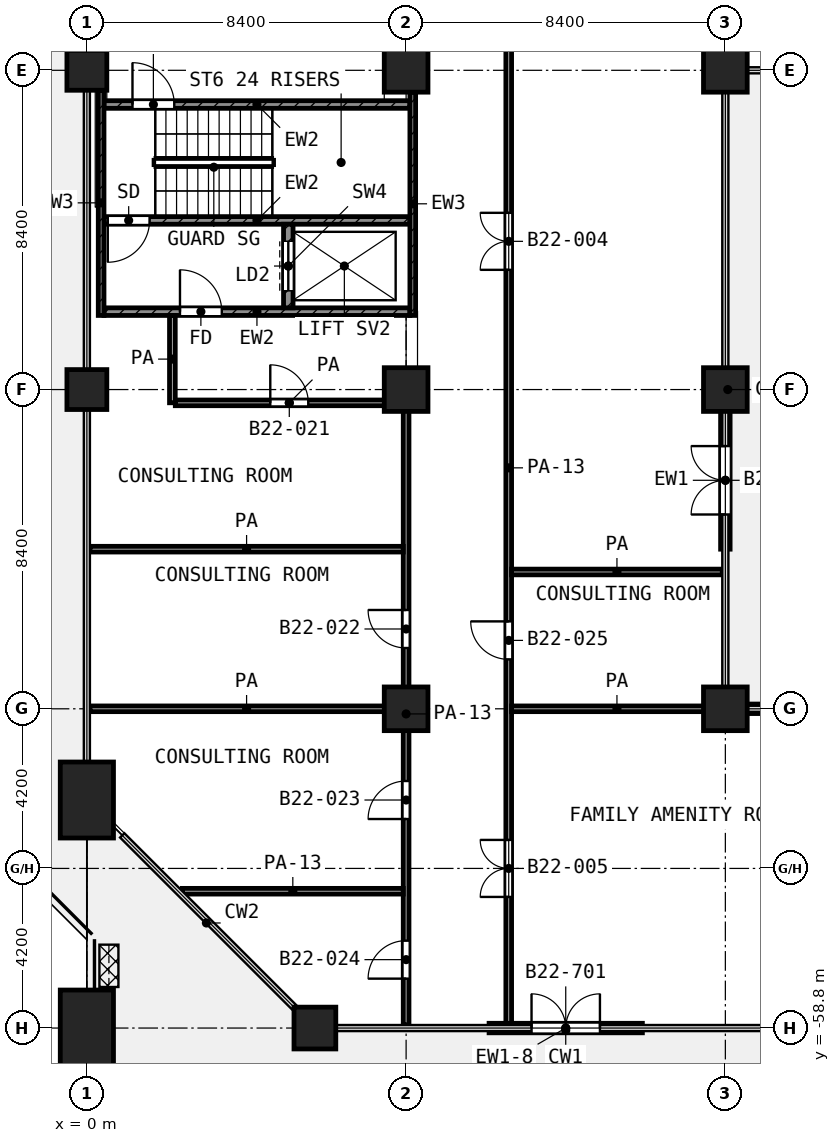
"""IFC4 building model, lengths in metres.
Left out: names, types, materials, properties, quantities, classifications, styles, units other than length and angle.
Written with IfcOpenShell. Run it as: python <this file> out.ifc"""

import sys

from ifc_helpers import new_model, si_unit, direction, frame, frame_2d, origin, origin_2d, place, context, subcontext, project, spatial, rectangle, extrude, element, fill, save


model = new_model("IFC4")
c1 = context("Model", 3, precision=1e-05, world=origin(), true_north=direction((0.0, 1.0)))
c2 = subcontext(c1, "Body", "Model", "MODEL_VIEW")
j1 = project(units=[si_unit("LENGTHUNIT", "METRE"), si_unit("PLANEANGLEUNIT", "RADIAN")], contexts=[c1])
p1 = place(None, origin())
s1 = spatial("IfcSite", under=j1, at=p1, CompositionType="ELEMENT")
p2 = place(p1, origin())
s2 = spatial("IfcBuilding", under=s1, at=p2, CompositionType="ELEMENT")
p3 = place(p2, frame((0.0, 0.0, 98.8)))
s3 = spatial("IfcBuildingStorey", under=s2, at=p3, CompositionType="ELEMENT", Elevation=98.8)
p4 = place(p3, frame((0.0, -33.6, 0.0), z_axis=(0.0, 0.0, 1.0), x_axis=(1.0, 0.0, 0.0)))
e1 = element("IfcColumn", 1, at=p4, inside=s3, PredefinedType="COLUMN", context=c2, shape_type="SweptSolid", body=[
    extrude(rectangle(XDim=1.05, YDim=1.05, at=origin_2d()), origin(), (0.0, 0.0, 1.0), 4.2),
])
for number, where, z_axis, x_axis in (
    (2, (8.4, -33.6, 0.0), (0.0, 0.0, 1.0), (1.0, 0.0, 0.0)),
    (3, (16.8, -33.6, 0.0), (0.0, 0.0, 1.0), (1.0, 0.0, 0.0)),
):
    element("IfcColumn", number, at=place(p3, frame(where, z_axis=z_axis, x_axis=x_axis)), inside=s3, PredefinedType="COLUMN", context=c2, shape_type="SweptSolid", body=[
        extrude(rectangle(XDim=1.15, YDim=1.15, at=origin_2d()), origin(), (0.0, 0.0, 1.0), 4.2),
    ])
p5 = place(p3, frame((0.0, -42.0, 0.0), z_axis=(0.0, 0.0, 1.0), x_axis=(1.0, 0.0, 0.0)))
e4 = element("IfcColumn", 4, at=p5, inside=s3, PredefinedType="COLUMN", context=c2, shape_type="SweptSolid", body=[
    extrude(rectangle(XDim=1.05, YDim=1.05, at=origin_2d()), origin(), (0.0, 0.0, 1.0), 4.2),
])
for number, where, z_axis, x_axis in (
    (5, (8.4, -42.0, 0.0), (0.0, 0.0, 1.0), (1.0, 0.0, 0.0)),
    (6, (16.8, -42.0, 0.0), (0.0, 0.0, 1.0), (1.0, 0.0, 0.0)),
    (7, (8.4, -50.4, 0.0), (0.0, 0.0, 1.0), (1.0, 0.0, 0.0)),
    (8, (16.8, -50.4, 0.0), (0.0, 0.0, 1.0), (1.0, 0.0, 0.0)),
):
    element("IfcColumn", number, at=place(p3, frame(where, z_axis=z_axis, x_axis=x_axis)), inside=s3, PredefinedType="COLUMN", context=c2, shape_type="SweptSolid", body=[
        extrude(rectangle(XDim=1.15, YDim=1.15, at=origin_2d()), origin(), (0.0, 0.0, 1.0), 4.2),
    ])
p6 = place(p3, frame((0.0, -52.8, 0.0), z_axis=(0.0, 0.0, 1.0), x_axis=(0.0, 1.0, 0.0)))
e9 = element("IfcColumn", 9, at=p6, inside=s3, PredefinedType="COLUMN", context=c2, shape_type="SweptSolid", body=[
    extrude(rectangle(XDim=2.0, YDim=1.4, at=origin_2d()), origin(), (0.0, 0.0, 1.0), 4.2),
])
p7 = place(p3, frame((6.0, -58.8, 0.0), z_axis=(0.0, 0.0, 1.0), x_axis=(1.0, 0.0, 0.0)))
e10 = element("IfcColumn", 10, at=p7, inside=s3, PredefinedType="COLUMN", context=c2, shape_type="SweptSolid", body=[
    extrude(rectangle(XDim=1.1, YDim=1.1, at=origin_2d()), origin(), (0.0, 0.0, 1.0), 4.2),
])
p8 = place(p3, frame((0.0, -58.8, 0.0), z_axis=(0.0, 0.0, 1.0), x_axis=(0.0, 1.0, 0.0)))
e11 = element("IfcColumn", 11, at=p8, inside=s3, PredefinedType="COLUMN", context=c2, shape_type="SweptSolid", body=[
    extrude(rectangle(XDim=2.0, YDim=1.4, at=origin_2d()), origin(), (0.0, 0.0, 1.0), 4.2),
])
p9 = place(p3, frame((20.938, -50.4, 0.0), z_axis=(0.0, 0.0, 1.0), x_axis=(-1.0, 0.0, 0.0)))
e12 = element("IfcWall", 12, at=p9, inside=s3, PredefinedType="SOLIDWALL", context=c2, shape_type="SweptSolid", body=[
    extrude(rectangle(XDim=3.562, YDim=0.25, at=frame_2d((1.781, 0.0))), origin(), (0.0, 0.0, 1.0), 3.46),
])
p10 = place(p9, frame((0.881, 0.0, 0.0)))
e13 = element("IfcOpeningElement", 13, at=p10, cuts=e12, PredefinedType="OPENING", context=c2, shape_type="SweptSolid", body=[
    extrude(rectangle(XDim=1.8, YDim=2.1, at=frame_2d((0.9, 1.05))), frame((0.0, 0.135, 0.0), z_axis=(0.0, -1.0, 0.0), x_axis=(1.0, 0.0, 0.0)), (0.0, 0.0, 1.0), 0.27),
])
p11 = place(p3, frame((16.8, -46.2, 0.0), z_axis=(0.0, 0.0, 1.0), x_axis=(0.0, 1.0, 0.0)))
e14 = element("IfcWall", 14, at=p11, inside=s3, PredefinedType="SOLIDWALL", context=c2, shape_type="SweptSolid", body=[
    extrude(rectangle(XDim=3.625, YDim=0.25, at=frame_2d((1.812, 0.0))), origin(), (0.0, 0.0, 1.0), 3.46),
])
p12 = place(p11, frame((0.913, 0.0, 0.0)))
e15 = element("IfcOpeningElement", 15, at=p12, cuts=e14, PredefinedType="OPENING", context=c2, shape_type="SweptSolid", body=[
    extrude(rectangle(XDim=1.8, YDim=2.1, at=frame_2d((0.9, 1.05))), frame((0.0, 0.135, 0.0), z_axis=(0.0, -1.0, 0.0), x_axis=(1.0, 0.0, 0.0)), (0.0, 0.0, 1.0), 0.27),
])
p13 = place(p3, frame((10.583, -58.8, 0.0), z_axis=(0.0, 0.0, 1.0), x_axis=(1.0, 0.0, 0.0)))
e16 = element("IfcWall", 16, at=p13, inside=s3, PredefinedType="SOLIDWALL", context=c2, shape_type="SweptSolid", body=[
    extrude(rectangle(XDim=4.033, YDim=0.25, at=frame_2d((2.017, 0.0))), origin(), (0.0, 0.0, 1.0), 2.58),
])
p14 = place(p13, frame((1.117, 0.0, 0.0)))
e17 = element("IfcOpeningElement", 17, at=p14, cuts=e16, PredefinedType="OPENING", context=c2, shape_type="SweptSolid", body=[
    extrude(rectangle(XDim=1.8, YDim=2.1, at=frame_2d((0.9, 1.05))), frame((0.0, 0.135, 0.0), z_axis=(0.0, -1.0, 0.0), x_axis=(1.0, 0.0, 0.0)), (0.0, 0.0, 1.0), 0.27),
])
p15 = place(p3, frame((0.375, -40.05, 0.0), z_axis=(0.0, 0.0, 1.0), x_axis=(0.0, 1.0, 0.0)))
e18 = element("IfcWall", 18, at=p15, inside=s3, PredefinedType="SHEAR", context=c2, shape_type="SweptSolid", body=[
    extrude(rectangle(XDim=5.925, YDim=0.15, at=frame_2d((2.962, 0.0))), origin(), (0.0, 0.0, 1.0), 3.6),
])
p16 = place(p3, frame((8.575, -40.05, 0.0), z_axis=(0.0, 0.0, 1.0), x_axis=(0.0, 1.0, 0.0)))
e19 = element("IfcWall", 19, at=p16, inside=s3, PredefinedType="SHEAR", context=c2, shape_type="SweptSolid", body=[
    extrude(rectangle(XDim=5.875, YDim=0.15, at=frame_2d((2.938, 0.0))), origin(), (0.0, 0.0, 1.0), 3.6),
])
p17 = place(p3, frame((0.45, -34.5, 0.0), z_axis=(0.0, 0.0, 1.0), x_axis=(1.0, 0.0, 0.0)))
e20 = element("IfcWall", 20, at=p17, inside=s3, PredefinedType="SHEAR", context=c2, shape_type="SweptSolid", body=[
    extrude(rectangle(XDim=8.05, YDim=0.2, at=frame_2d((4.025, 0.0))), origin(), (0.0, 0.0, 1.0), 3.6),
])
p18 = place(p17, frame((0.75, 0.0, 0.0)))
e21 = element("IfcOpeningElement", 21, at=p18, cuts=e20, PredefinedType="OPENING", context=c2, shape_type="SweptSolid", body=[
    extrude(rectangle(XDim=1.1, YDim=2.1, at=frame_2d((0.55, 1.05))), frame((0.0, 0.11, 0.0), z_axis=(0.0, -1.0, 0.0), x_axis=(1.0, 0.0, 0.0)), (0.0, 0.0, 1.0), 0.22),
])
p19 = place(p3, frame((0.45, -37.55, 0.0), z_axis=(0.0, 0.0, 1.0), x_axis=(1.0, 0.0, 0.0)))
e22 = element("IfcWall", 22, at=p19, inside=s3, PredefinedType="SHEAR", context=c2, shape_type="SweptSolid", body=[
    extrude(rectangle(XDim=8.05, YDim=0.2, at=frame_2d((4.025, 0.0))), origin(), (0.0, 0.0, 1.0), 3.6),
])
p20 = place(p19, frame((0.1, 0.0, 0.0)))
e23 = element("IfcOpeningElement", 23, at=p20, cuts=e22, PredefinedType="OPENING", context=c2, shape_type="SweptSolid", body=[
    extrude(rectangle(XDim=1.1, YDim=2.1, at=frame_2d((0.55, 1.05))), frame((0.0, 0.11, 0.0), z_axis=(0.0, -1.0, 0.0), x_axis=(1.0, 0.0, 0.0)), (0.0, 0.0, 1.0), 0.22),
])
p21 = place(p3, frame((0.45, -39.95, 0.0), z_axis=(0.0, 0.0, 1.0), x_axis=(1.0, 0.0, 0.0)))
e24 = element("IfcWall", 24, at=p21, inside=s3, PredefinedType="SHEAR", context=c2, shape_type="SweptSolid", body=[
    extrude(rectangle(XDim=8.05, YDim=0.2, at=frame_2d((4.025, 0.0))), origin(), (0.0, 0.0, 1.0), 3.6),
])
p22 = place(p21, frame((2.0, 0.0, 0.0)))
e25 = element("IfcOpeningElement", 25, at=p22, cuts=e24, PredefinedType="OPENING", context=c2, shape_type="SweptSolid", body=[
    extrude(rectangle(XDim=1.1, YDim=2.1, at=frame_2d((0.55, 1.05))), frame((0.0, 0.11, 0.0), z_axis=(0.0, -1.0, 0.0), x_axis=(1.0, 0.0, 0.0)), (0.0, 0.0, 1.0), 0.22),
])
p23 = place(p3, frame((5.3, -39.85, 0.0), z_axis=(0.0, 0.0, 1.0), x_axis=(0.0, 1.0, 0.0)))
e26 = element("IfcWall", 26, at=p23, inside=s3, PredefinedType="SHEAR", context=c2, shape_type="SweptSolid", body=[
    extrude(rectangle(XDim=2.2, YDim=0.25, at=frame_2d((1.1, 0.0))), origin(), (0.0, 0.0, 1.0), 3.6),
])
p24 = place(p23, frame((0.45, 0.0, 0.0)))
e27 = element("IfcOpeningElement", 27, at=p24, cuts=e26, PredefinedType="OPENING", context=c2, shape_type="SweptSolid", body=[
    extrude(rectangle(XDim=1.3, YDim=2.1, at=frame_2d((0.65, 1.05))), frame((0.0, 0.135, 0.0), z_axis=(0.0, -1.0, 0.0), x_axis=(1.0, 0.0, 0.0)), (0.0, 0.0, 1.0), 0.27),
])
p25 = place(p3, frame((2.513, -55.2, 0.0), z_axis=(0.0, 0.0, 1.0), x_axis=(1.0, 0.0, 0.0)))
e28 = element("IfcWall", 28, at=p25, inside=s3, PredefinedType="PARTITIONING", context=c2, shape_type="SweptSolid", body=[
    extrude(rectangle(XDim=5.812, YDim=0.15, at=frame_2d((2.906, 0.0))), origin(), (0.0, 0.0, 1.0), 2.7),
])
p26 = place(p3, frame((0.08, -50.4, 0.0), z_axis=(0.0, 0.0, 1.0), x_axis=(1.0, 0.0, 0.0)))
e29 = element("IfcWall", 29, at=p26, inside=s3, PredefinedType="PARTITIONING", context=c2, shape_type="SweptSolid", body=[
    extrude(rectangle(XDim=8.245, YDim=0.15, at=frame_2d((4.123, 0.0))), origin(), (0.0, 0.0, 1.0), 3.6),
])
for number, where, z_axis, x_axis in (
    (30, (11.175, -50.4, 0.0), (0.0, 0.0, 1.0), (1.0, 0.0, 0.0)),
    (31, (11.175, -46.8, 0.0), (0.0, 0.0, 1.0), (1.0, 0.0, 0.0)),
):
    element("IfcWall", number, at=place(p3, frame(where, z_axis=z_axis, x_axis=x_axis)), inside=s3, PredefinedType="PARTITIONING", context=c2, shape_type="SweptSolid", body=[
        extrude(rectangle(XDim=5.545, YDim=0.15, at=frame_2d((2.772, 0.0))), origin(), (0.0, 0.0, 1.0), 3.6),
    ])
p27 = place(p3, frame((0.08, -46.2, 0.0), z_axis=(0.0, 0.0, 1.0), x_axis=(1.0, 0.0, 0.0)))
e32 = element("IfcWall", 32, at=p27, inside=s3, PredefinedType="PARTITIONING", context=c2, shape_type="SweptSolid", body=[
    extrude(rectangle(XDim=8.245, YDim=0.15, at=frame_2d((4.123, 0.0))), origin(), (0.0, 0.0, 1.0), 3.6),
])
p28 = place(p3, frame((2.327, -42.35, 0.0), z_axis=(0.0, 0.0, 1.0), x_axis=(1.0, 0.0, 0.0)))
e33 = element("IfcWall", 33, at=p28, inside=s3, PredefinedType="PARTITIONING", context=c2, shape_type="SweptSolid", body=[
    extrude(rectangle(XDim=5.998, YDim=0.15, at=frame_2d((2.999, 0.0))), origin(), (0.0, 0.0, 1.0), 3.6),
])
p29 = place(p28, frame((2.499, 0.0, 0.0)))
e34 = element("IfcOpeningElement", 34, at=p29, cuts=e33, PredefinedType="OPENING", context=c2, shape_type="SweptSolid", body=[
    extrude(rectangle(XDim=1.0, YDim=2.1, at=frame_2d((0.5, 1.05))), frame((0.0, 0.085, 0.0), z_axis=(0.0, -1.0, 0.0), x_axis=(1.0, 0.0, 0.0)), (0.0, 0.0, 1.0), 0.17),
])
p30 = place(p3, frame((2.25, -42.348, 0.0), z_axis=(0.0, 0.0, 1.0), x_axis=(0.0, 1.0, 0.0)))
e35 = element("IfcWall", 35, at=p30, inside=s3, PredefinedType="PARTITIONING", context=c2, shape_type="SweptSolid", body=[
    extrude(rectangle(XDim=2.298, YDim=0.15, at=frame_2d((1.149, 0.0))), origin(), (0.0, 0.0, 1.0), 3.6),
])
p31 = place(p3, frame((8.4, -58.72, 0.0), z_axis=(0.0, 0.0, 1.0), x_axis=(0.0, 1.0, 0.0)))
e36 = element("IfcWall", 36, at=p31, inside=s3, PredefinedType="PARTITIONING", context=c2, shape_type="SweptSolid", body=[
    extrude(rectangle(XDim=16.37, YDim=0.15, at=frame_2d((8.185, 0.0))), origin(), (0.0, 0.0, 1.0), 2.7),
])
p32 = place(p31, frame((9.92, 0.0, 0.0)))
e37 = element("IfcOpeningElement", 37, at=p32, cuts=e36, PredefinedType="OPENING", context=c2, shape_type="SweptSolid", body=[
    extrude(rectangle(XDim=1.0, YDim=2.1, at=frame_2d((0.5, 1.05))), frame((0.0, 0.085, 0.0), z_axis=(0.0, -1.0, 0.0), x_axis=(1.0, 0.0, 0.0)), (0.0, 0.0, 1.0), 0.17),
])
p33 = place(p31, frame((5.42, 0.0, 0.0)))
e38 = element("IfcOpeningElement", 38, at=p33, cuts=e36, PredefinedType="OPENING", context=c2, shape_type="SweptSolid", body=[
    extrude(rectangle(XDim=1.0, YDim=2.1, at=frame_2d((0.5, 1.05))), frame((0.0, 0.085, 0.0), z_axis=(0.0, -1.0, 0.0), x_axis=(1.0, 0.0, 0.0)), (0.0, 0.0, 1.0), 0.17),
])
p34 = place(p31, frame((1.22, 0.0, 0.0)))
e39 = element("IfcOpeningElement", 39, at=p34, cuts=e36, PredefinedType="OPENING", context=c2, shape_type="SweptSolid", body=[
    extrude(rectangle(XDim=1.0, YDim=2.1, at=frame_2d((0.5, 1.05))), frame((0.0, 0.085, 0.0), z_axis=(0.0, -1.0, 0.0), x_axis=(1.0, 0.0, 0.0)), (0.0, 0.0, 1.0), 0.17),
])
p35 = place(p3, frame((11.1, -58.72, 0.0), z_axis=(0.0, 0.0, 1.0), x_axis=(0.0, 1.0, 0.0)))
e40 = element("IfcWall", 40, at=p35, inside=s3, PredefinedType="PARTITIONING", context=c2, shape_type="SweptSolid", body=[
    extrude(rectangle(XDim=29.32, YDim=0.15, at=frame_2d((14.66, 0.0))), origin(), (0.0, 0.0, 1.0), 2.7),
])
p36 = place(p35, frame((19.87, 0.0, 0.0)))
e41 = element("IfcOpeningElement", 41, at=p36, cuts=e40, PredefinedType="OPENING", context=c2, shape_type="SweptSolid", body=[
    extrude(rectangle(XDim=1.5, YDim=2.1, at=frame_2d((0.75, 1.05))), frame((0.0, 0.085, 0.0), z_axis=(0.0, -1.0, 0.0), x_axis=(1.0, 0.0, 0.0)), (0.0, 0.0, 1.0), 0.17),
])
p37 = place(p35, frame((9.62, 0.0, 0.0)))
e42 = element("IfcOpeningElement", 42, at=p37, cuts=e40, PredefinedType="OPENING", context=c2, shape_type="SweptSolid", body=[
    extrude(rectangle(XDim=1.0, YDim=2.1, at=frame_2d((0.5, 1.05))), frame((0.0, 0.085, 0.0), z_axis=(0.0, -1.0, 0.0), x_axis=(1.0, 0.0, 0.0)), (0.0, 0.0, 1.0), 0.17),
])
p38 = place(p35, frame((3.37, 0.0, 0.0)))
e43 = element("IfcOpeningElement", 43, at=p38, cuts=e40, PredefinedType="OPENING", context=c2, shape_type="SweptSolid", body=[
    extrude(rectangle(XDim=1.5, YDim=2.1, at=frame_2d((0.75, 1.05))), frame((0.0, 0.085, 0.0), z_axis=(0.0, -1.0, 0.0), x_axis=(1.0, 0.0, 0.0)), (0.0, 0.0, 1.0), 0.17),
])
p39 = place(p12, origin())
e44 = element("IfcDoor", 44, at=p39, inside=s3, OperationType="DOUBLE_DOOR_SINGLE_SWING", PredefinedType="DOOR", context=c2, shape_type="SweptSolid", body=[
    extrude(rectangle(XDim=1.8, YDim=2.1, at=frame_2d((0.9, 1.05))), frame((0.0, 0.025, 0.0), z_axis=(0.0, -1.0, 0.0), x_axis=(1.0, 0.0, 0.0)), (0.0, 0.0, 1.0), 0.05),
])
fill(e15, e44)
p40 = place(p14, origin())
e45 = element("IfcDoor", 45, at=p40, inside=s3, OperationType="DOUBLE_DOOR_SINGLE_SWING", PredefinedType="DOOR", context=c2, shape_type="SweptSolid", body=[
    extrude(rectangle(XDim=1.8, YDim=2.1, at=frame_2d((0.9, 1.05))), frame((0.0, 0.025, 0.0), z_axis=(0.0, -1.0, 0.0), x_axis=(1.0, 0.0, 0.0)), (0.0, 0.0, 1.0), 0.05),
])
fill(e17, e45)
p41 = place(p18, origin())
e46 = element("IfcDoor", 46, at=p41, inside=s3, OperationType="SINGLE_SWING_LEFT", PredefinedType="DOOR", context=c2, shape_type="SweptSolid", body=[
    extrude(rectangle(XDim=1.1, YDim=2.1, at=frame_2d((0.55, 1.05))), frame((0.0, 0.025, 0.0), z_axis=(0.0, -1.0, 0.0), x_axis=(1.0, 0.0, 0.0)), (0.0, 0.0, 1.0), 0.05),
])
fill(e21, e46)
p42 = place(p20, frame((1.1, 0.0, 0.0), z_axis=(0.0, 0.0, 1.0), x_axis=(-1.0, 0.0, 0.0)))
e47 = element("IfcDoor", 47, at=p42, inside=s3, OperationType="SINGLE_SWING_LEFT", PredefinedType="DOOR", context=c2, shape_type="SweptSolid", body=[
    extrude(rectangle(XDim=1.1, YDim=2.1, at=frame_2d((0.55, 1.05))), frame((0.0, 0.025, 0.0), z_axis=(0.0, -1.0, 0.0), x_axis=(1.0, 0.0, 0.0)), (0.0, 0.0, 1.0), 0.05),
])
fill(e23, e47)
p43 = place(p24, origin())
e48 = element("IfcDoor", 48, at=p43, inside=s3, OperationType="DOUBLE_DOOR_SLIDING", PredefinedType="DOOR", context=c2, shape_type="SweptSolid", body=[
    extrude(rectangle(XDim=1.3, YDim=2.1, at=frame_2d((0.65, 1.05))), frame((0.0, 0.025, 0.0), z_axis=(0.0, -1.0, 0.0), x_axis=(1.0, 0.0, 0.0)), (0.0, 0.0, 1.0), 0.05),
])
fill(e27, e48)
p44 = place(p22, origin())
e49 = element("IfcDoor", 49, at=p44, inside=s3, OperationType="SINGLE_SWING_LEFT", PredefinedType="DOOR", context=c2, shape_type="SweptSolid", body=[
    extrude(rectangle(XDim=1.1, YDim=2.1, at=frame_2d((0.55, 1.05))), frame((0.0, 0.025, 0.0), z_axis=(0.0, -1.0, 0.0), x_axis=(1.0, 0.0, 0.0)), (0.0, 0.0, 1.0), 0.05),
])
fill(e25, e49)
p45 = place(p29, origin())
e50 = element("IfcDoor", 50, at=p45, inside=s3, OperationType="SINGLE_SWING_LEFT", PredefinedType="DOOR", context=c2, shape_type="SweptSolid", body=[
    extrude(rectangle(XDim=1.0, YDim=2.1, at=frame_2d((0.5, 1.05))), frame((0.0, 0.025, 0.0), z_axis=(0.0, -1.0, 0.0), x_axis=(1.0, 0.0, 0.0)), (0.0, 0.0, 1.0), 0.05),
])
fill(e34, e50)
p46 = place(p32, origin())
e51 = element("IfcDoor", 51, at=p46, inside=s3, OperationType="SINGLE_SWING_RIGHT", PredefinedType="DOOR", context=c2, shape_type="SweptSolid", body=[
    extrude(rectangle(XDim=1.0, YDim=2.1, at=frame_2d((0.5, 1.05))), frame((0.0, 0.025, 0.0), z_axis=(0.0, -1.0, 0.0), x_axis=(1.0, 0.0, 0.0)), (0.0, 0.0, 1.0), 0.05),
])
fill(e37, e51)
p47 = place(p33, origin())
e52 = element("IfcDoor", 52, at=p47, inside=s3, OperationType="SINGLE_SWING_LEFT", PredefinedType="DOOR", context=c2, shape_type="SweptSolid", body=[
    extrude(rectangle(XDim=1.0, YDim=2.1, at=frame_2d((0.5, 1.05))), frame((0.0, 0.025, 0.0), z_axis=(0.0, -1.0, 0.0), x_axis=(1.0, 0.0, 0.0)), (0.0, 0.0, 1.0), 0.05),
])
fill(e38, e52)
p48 = place(p34, origin())
e53 = element("IfcDoor", 53, at=p48, inside=s3, OperationType="SINGLE_SWING_LEFT", PredefinedType="DOOR", context=c2, shape_type="SweptSolid", body=[
    extrude(rectangle(XDim=1.0, YDim=2.1, at=frame_2d((0.5, 1.05))), frame((0.0, 0.025, 0.0), z_axis=(0.0, -1.0, 0.0), x_axis=(1.0, 0.0, 0.0)), (0.0, 0.0, 1.0), 0.05),
])
fill(e39, e53)
p49 = place(p36, origin())
e54 = element("IfcDoor", 54, at=p49, inside=s3, OperationType="DOUBLE_DOOR_SINGLE_SWING", PredefinedType="DOOR", context=c2, shape_type="SweptSolid", body=[
    extrude(rectangle(XDim=1.5, YDim=2.1, at=frame_2d((0.75, 1.05))), frame((0.0, 0.025, 0.0), z_axis=(0.0, -1.0, 0.0), x_axis=(1.0, 0.0, 0.0)), (0.0, 0.0, 1.0), 0.05),
])
fill(e41, e54)
p50 = place(p37, origin())
e55 = element("IfcDoor", 55, at=p50, inside=s3, OperationType="SINGLE_SWING_RIGHT", PredefinedType="DOOR", context=c2, shape_type="SweptSolid", body=[
    extrude(rectangle(XDim=1.0, YDim=2.1, at=frame_2d((0.5, 1.05))), frame((0.0, 0.025, 0.0), z_axis=(0.0, -1.0, 0.0), x_axis=(1.0, 0.0, 0.0)), (0.0, 0.0, 1.0), 0.05),
])
fill(e42, e55)
p51 = place(p38, origin())
e56 = element("IfcDoor", 56, at=p51, inside=s3, OperationType="DOUBLE_DOOR_SINGLE_SWING", PredefinedType="DOOR", context=c2, shape_type="SweptSolid", body=[
    extrude(rectangle(XDim=1.5, YDim=2.1, at=frame_2d((0.75, 1.05))), frame((0.0, 0.025, 0.0), z_axis=(0.0, -1.0, 0.0), x_axis=(1.0, 0.0, 0.0)), (0.0, 0.0, 1.0), 0.05),
])
fill(e43, e56)
save(model, sys.argv[1])
